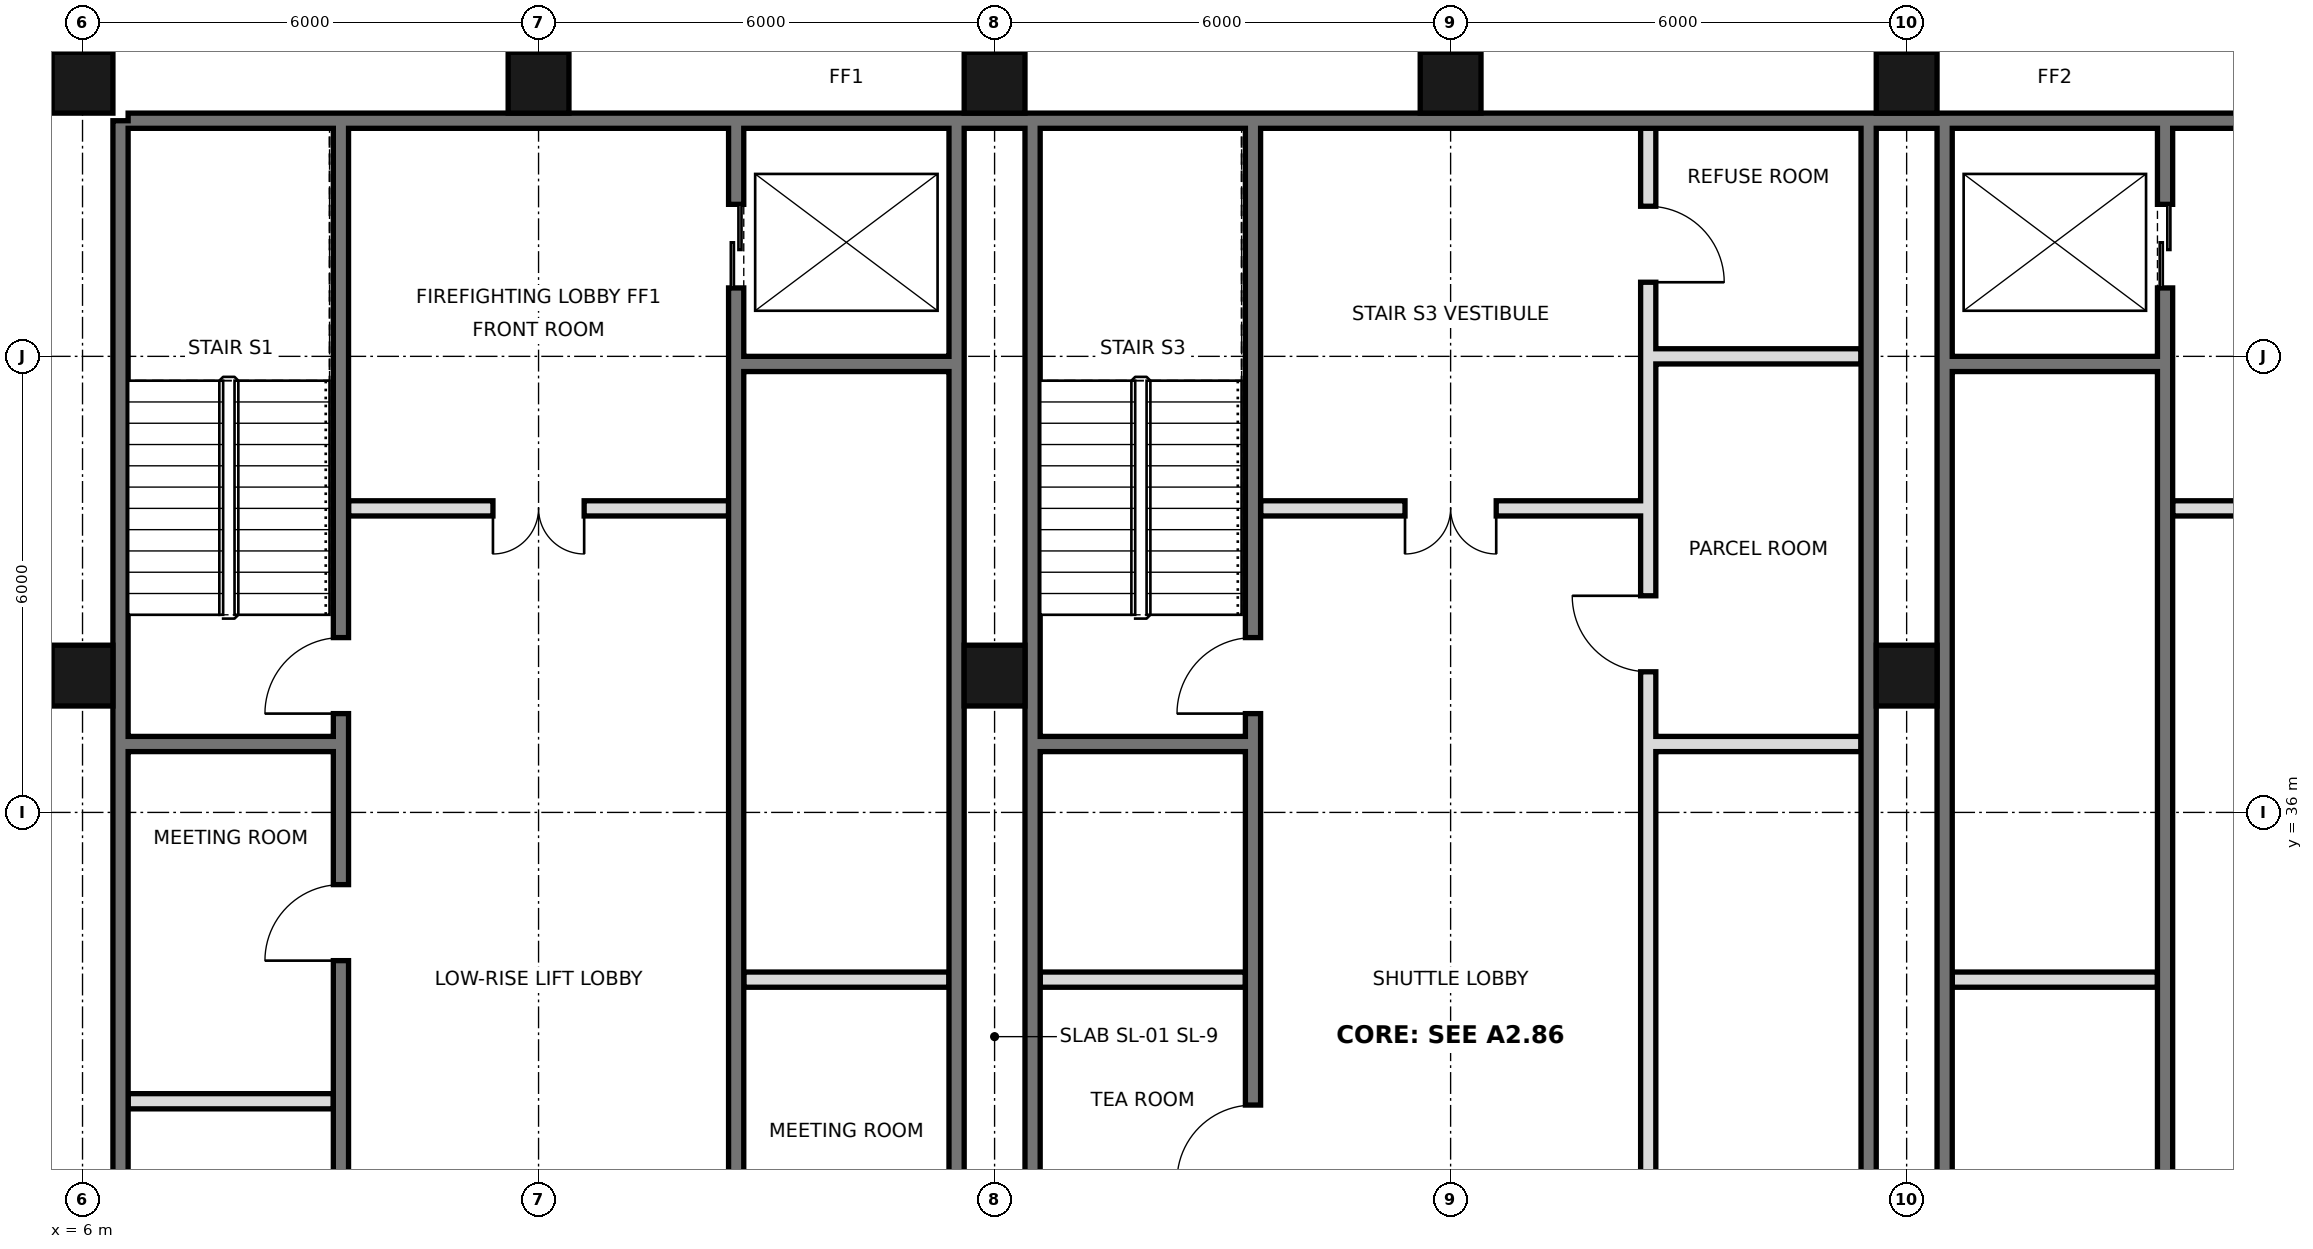
"""IFC4 building model, lengths in metres.
Left out: names, types, materials, properties, quantities, classifications, styles, units other than length and angle.
Written with IfcOpenShell. Run it as: python <this file> out.ifc"""

import sys

from ifc_helpers import new_model, si_unit, direction, frame, frame_2d, origin, origin_2d, place, context, subcontext, project, spatial, rectangle, hollow_rectangle, extrude, element, fill, save


model = new_model("IFC4")
c1 = context("Model", 3, precision=1e-05, world=origin(), true_north=direction((0.0, 1.0)))
c2 = subcontext(c1, "Body", "Model", "MODEL_VIEW")
j1 = project(units=[si_unit("LENGTHUNIT", "METRE"), si_unit("PLANEANGLEUNIT", "RADIAN")], contexts=[c1])
p1 = place(None, origin())
s1 = spatial("IfcSite", under=j1, at=p1, CompositionType="ELEMENT")
p2 = place(p1, origin())
s2 = spatial("IfcBuilding", under=s1, at=p2, CompositionType="ELEMENT")
p3 = place(p2, frame((0.0, 0.0, 345.8)))
s3 = spatial("IfcBuildingStorey", under=s2, at=p3, CompositionType="ELEMENT", Elevation=345.8)
for number, where, z_axis, x_axis in (
    (1, (6.0, 37.8, 0.0), (0.0, 0.0, 1.0), (1.0, 0.0, 0.0)),
    (2, (6.0, 45.6, 0.0), (0.0, 0.0, 1.0), (1.0, 0.0, 0.0)),
    (3, (12.0, 45.6, 0.0), (0.0, 0.0, 1.0), (1.0, 0.0, 0.0)),
    (4, (18.0, 37.8, 0.0), (0.0, 0.0, 1.0), (1.0, 0.0, 0.0)),
    (5, (18.0, 45.6, 0.0), (0.0, 0.0, 1.0), (1.0, 0.0, 0.0)),
    (6, (24.0, 45.6, 0.0), (0.0, 0.0, 1.0), (1.0, 0.0, 0.0)),
    (7, (30.0, 37.8, 0.0), (0.0, 0.0, 1.0), (1.0, 0.0, 0.0)),
    (8, (30.0, 45.6, 0.0), (0.0, 0.0, 1.0), (1.0, 0.0, 0.0)),
):
    element("IfcColumn", number, at=place(p3, frame(where, z_axis=z_axis, x_axis=x_axis)), inside=s3, PredefinedType="COLUMN", context=c2, shape_type="SweptSolid", body=[
        extrude(hollow_rectangle(XDim=0.8, YDim=0.8, WallThickness=0.025, at=origin_2d()), origin(), (0.0, 0.0, 1.0), 4.0),
    ])
p4 = place(p3, frame((6.5, 21.6, 0.0), z_axis=(0.0, 0.0, 1.0), x_axis=(0.0, 1.0, 0.0)))
e9 = element("IfcWall", 9, at=p4, inside=s3, PredefinedType="SOLIDWALL", context=c2, shape_type="SweptSolid", body=[
    extrude(rectangle(XDim=23.5, YDim=0.2, at=frame_2d((11.75, 0.0))), origin(), (0.0, 0.0, 1.0), 3.75),
])
p5 = place(p3, frame((6.6, 45.1, 0.0), z_axis=(0.0, 0.0, 1.0), x_axis=(1.0, 0.0, 0.0)))
e10 = element("IfcWall", 10, at=p5, inside=s3, PredefinedType="SOLIDWALL", context=c2, shape_type="SweptSolid", body=[
    extrude(rectangle(XDim=34.8, YDim=0.2, at=frame_2d((17.4, 0.0))), origin(), (0.0, 0.0, 1.0), 3.75),
])
for number, where, z_axis, x_axis in (
    (11, (17.5, 27.6, 0.0), (0.0, 0.0, 1.0), (0.0, 1.0, 0.0)),
    (12, (18.5, 27.6, 0.0), (0.0, 0.0, 1.0), (0.0, 1.0, 0.0)),
    (13, (29.5, 27.6, 0.0), (0.0, 0.0, 1.0), (0.0, 1.0, 0.0)),
    (14, (30.5, 27.6, 0.0), (0.0, 0.0, 1.0), (0.0, 1.0, 0.0)),
):
    element("IfcWall", number, at=place(p3, frame(where, z_axis=z_axis, x_axis=x_axis)), inside=s3, PredefinedType="SOLIDWALL", context=c2, shape_type="SweptSolid", body=[
        extrude(rectangle(XDim=17.5, YDim=0.2, at=frame_2d((8.75, 0.0))), origin(), (0.0, 0.0, 1.0), 3.75),
    ])
p6 = place(p3, frame((14.6, 27.5, 0.0), z_axis=(0.0, 0.0, 1.0), x_axis=(0.0, 1.0, 0.0)))
e15 = element("IfcWall", 15, at=p6, inside=s3, PredefinedType="SOLIDWALL", context=c2, shape_type="SweptSolid", body=[
    extrude(rectangle(XDim=17.5, YDim=0.2, at=frame_2d((8.75, 0.0))), origin(), (0.0, 0.0, 1.0), 3.75),
])
p7 = place(p6, frame((15.4, 0.0, 0.0)))
e16 = element("IfcOpeningElement", 16, at=p7, cuts=e15, PredefinedType="OPENING", context=c2, shape_type="SweptSolid", body=[
    extrude(rectangle(XDim=1.1, YDim=2.1, at=frame_2d((0.55, 1.05))), frame((0.0, 0.11, 0.0), z_axis=(0.0, -1.0, 0.0), x_axis=(1.0, 0.0, 0.0)), (0.0, 0.0, 1.0), 0.22),
])
p8 = place(p6, frame((2.7, 0.0, 0.0)))
e17 = element("IfcOpeningElement", 17, at=p8, cuts=e15, PredefinedType="OPENING", context=c2, shape_type="SweptSolid", body=[
    extrude(rectangle(XDim=1.0, YDim=2.1, at=frame_2d((0.5, 1.05))), frame((0.0, 0.11, 0.0), z_axis=(0.0, -1.0, 0.0), x_axis=(1.0, 0.0, 0.0)), (0.0, 0.0, 1.0), 0.22),
])
p9 = place(p3, frame((21.4, 27.5, 0.0), z_axis=(0.0, 0.0, 1.0), x_axis=(0.0, 1.0, 0.0)))
e18 = element("IfcWall", 18, at=p9, inside=s3, PredefinedType="SOLIDWALL", context=c2, shape_type="SweptSolid", body=[
    extrude(rectangle(XDim=17.5, YDim=0.2, at=frame_2d((8.75, 0.0))), origin(), (0.0, 0.0, 1.0), 3.75),
])
p10 = place(p9, frame((0.55, 0.0, 0.0)))
e19 = element("IfcOpeningElement", 19, at=p10, cuts=e18, PredefinedType="OPENING", context=c2, shape_type="SweptSolid", body=[
    extrude(rectangle(XDim=1.0, YDim=2.1, at=frame_2d((0.5, 1.05))), frame((0.0, 0.11, 0.0), z_axis=(0.0, -1.0, 0.0), x_axis=(1.0, 0.0, 0.0)), (0.0, 0.0, 1.0), 0.22),
])
p11 = place(p9, frame((3.65, 0.0, 0.0)))
e20 = element("IfcOpeningElement", 20, at=p11, cuts=e18, PredefinedType="OPENING", context=c2, shape_type="SweptSolid", body=[
    extrude(rectangle(XDim=1.0, YDim=2.1, at=frame_2d((0.5, 1.05))), frame((0.0, 0.11, 0.0), z_axis=(0.0, -1.0, 0.0), x_axis=(1.0, 0.0, 0.0)), (0.0, 0.0, 1.0), 0.22),
])
p12 = place(p9, frame((9.8, 0.0, 0.0)))
e21 = element("IfcOpeningElement", 21, at=p12, cuts=e18, PredefinedType="OPENING", context=c2, shape_type="SweptSolid", body=[
    extrude(rectangle(XDim=1.0, YDim=2.1, at=frame_2d((0.5, 1.05))), frame((0.0, 0.11, 0.0), z_axis=(0.0, -1.0, 0.0), x_axis=(1.0, 0.0, 0.0)), (0.0, 0.0, 1.0), 0.22),
])
p13 = place(p3, frame((26.6, 27.6, 0.0), z_axis=(0.0, 0.0, 1.0), x_axis=(0.0, 1.0, 0.0)))
e22 = element("IfcWall", 22, at=p13, inside=s3, PredefinedType="PARTITIONING", context=c2, shape_type="SweptSolid", body=[
    extrude(rectangle(XDim=17.4, YDim=0.2, at=frame_2d((8.7, 0.0))), origin(), (0.0, 0.0, 1.0), 3.75),
])
p14 = place(p13, frame((10.25, 0.0, 0.0)))
e23 = element("IfcOpeningElement", 23, at=p14, cuts=e22, PredefinedType="OPENING", context=c2, shape_type="SweptSolid", body=[
    extrude(rectangle(XDim=1.0, YDim=2.1, at=frame_2d((0.5, 1.05))), frame((0.0, 0.11, 0.0), z_axis=(0.0, -1.0, 0.0), x_axis=(1.0, 0.0, 0.0)), (0.0, 0.0, 1.0), 0.22),
])
p15 = place(p13, frame((15.375, 0.0, 0.0)))
e24 = element("IfcOpeningElement", 24, at=p15, cuts=e22, PredefinedType="OPENING", context=c2, shape_type="SweptSolid", body=[
    extrude(rectangle(XDim=1.0, YDim=2.1, at=frame_2d((0.5, 1.05))), frame((0.0, 0.11, 0.0), z_axis=(0.0, -1.0, 0.0), x_axis=(1.0, 0.0, 0.0)), (0.0, 0.0, 1.0), 0.22),
])
p16 = place(p3, frame((33.4, 27.5, 0.0), z_axis=(0.0, 0.0, 1.0), x_axis=(0.0, 1.0, 0.0)))
e25 = element("IfcWall", 25, at=p16, inside=s3, PredefinedType="SOLIDWALL", context=c2, shape_type="SweptSolid", body=[
    extrude(rectangle(XDim=17.5, YDim=0.2, at=frame_2d((8.75, 0.0))), origin(), (0.0, 0.0, 1.0), 3.75),
])
p17 = place(p16, frame((15.4, 0.0, 0.0)))
e26 = element("IfcOpeningElement", 26, at=p17, cuts=e25, PredefinedType="OPENING", context=c2, shape_type="SweptSolid", body=[
    extrude(rectangle(XDim=1.1, YDim=2.1, at=frame_2d((0.55, 1.05))), frame((0.0, 0.11, 0.0), z_axis=(0.0, -1.0, 0.0), x_axis=(1.0, 0.0, 0.0)), (0.0, 0.0, 1.0), 0.22),
])
p18 = place(p16, frame((2.7, 0.0, 0.0)))
e27 = element("IfcOpeningElement", 27, at=p18, cuts=e25, PredefinedType="OPENING", context=c2, shape_type="SweptSolid", body=[
    extrude(rectangle(XDim=1.0, YDim=2.1, at=frame_2d((0.5, 1.05))), frame((0.0, 0.11, 0.0), z_axis=(0.0, -1.0, 0.0), x_axis=(1.0, 0.0, 0.0)), (0.0, 0.0, 1.0), 0.22),
])
p19 = place(p3, frame((9.4, 21.5, 0.0), z_axis=(0.0, 0.0, 1.0), x_axis=(0.0, 1.0, 0.0)))
e28 = element("IfcWall", 28, at=p19, inside=s3, PredefinedType="SOLIDWALL", context=c2, shape_type="SweptSolid", body=[
    extrude(rectangle(XDim=23.5, YDim=0.2, at=frame_2d((11.75, 0.0))), origin(), (0.0, 0.0, 1.0), 3.75),
])
p20 = place(p19, frame((7.9, 0.0, 0.0)))
e29 = element("IfcOpeningElement", 29, at=p20, cuts=e28, PredefinedType="OPENING", context=c2, shape_type="SweptSolid", body=[
    extrude(rectangle(XDim=1.0, YDim=2.1, at=frame_2d((0.5, 1.05))), frame((0.0, 0.11, 0.0), z_axis=(0.0, -1.0, 0.0), x_axis=(1.0, 0.0, 0.0)), (0.0, 0.0, 1.0), 0.22),
])
p21 = place(p19, frame((12.55, 0.0, 0.0)))
e30 = element("IfcOpeningElement", 30, at=p21, cuts=e28, PredefinedType="OPENING", context=c2, shape_type="SweptSolid", body=[
    extrude(rectangle(XDim=1.0, YDim=2.1, at=frame_2d((0.5, 1.05))), frame((0.0, 0.11, 0.0), z_axis=(0.0, -1.0, 0.0), x_axis=(1.0, 0.0, 0.0)), (0.0, 0.0, 1.0), 0.22),
])
p22 = place(p19, frame((15.8, 0.0, 0.0)))
e31 = element("IfcOpeningElement", 31, at=p22, cuts=e28, PredefinedType="OPENING", context=c2, shape_type="SweptSolid", body=[
    extrude(rectangle(XDim=1.0, YDim=2.1, at=frame_2d((0.5, 1.05))), frame((0.0, 0.11, 0.0), z_axis=(0.0, -1.0, 0.0), x_axis=(1.0, 0.0, 0.0)), (0.0, 0.0, 1.0), 0.22),
])
p23 = place(p19, frame((0.275, 0.0, 0.0)))
e32 = element("IfcOpeningElement", 32, at=p23, cuts=e28, PredefinedType="OPENING", context=c2, shape_type="SweptSolid", body=[
    extrude(rectangle(XDim=0.9, YDim=2.1, at=frame_2d((0.45, 1.05))), frame((0.0, 0.11, 0.0), z_axis=(0.0, -1.0, 0.0), x_axis=(1.0, 0.0, 0.0)), (0.0, 0.0, 1.0), 0.22),
])
for number, where, z_axis, x_axis in (
    (33, (6.6, 32.2, 0.0), (0.0, 0.0, 1.0), (1.0, 0.0, 0.0)),
    (34, (14.7, 33.8, 0.0), (0.0, 0.0, 1.0), (1.0, 0.0, 0.0)),
    (35, (18.6, 33.8, 0.0), (0.0, 0.0, 1.0), (1.0, 0.0, 0.0)),
    (36, (30.6, 33.8, 0.0), (0.0, 0.0, 1.0), (1.0, 0.0, 0.0)),
):
    element("IfcWall", number, at=place(p3, frame(where, z_axis=z_axis, x_axis=x_axis)), inside=s3, PredefinedType="PARTITIONING", context=c2, shape_type="SweptSolid", body=[
        extrude(rectangle(XDim=2.7, YDim=0.2, at=frame_2d((1.35, 0.0))), origin(), (0.0, 0.0, 1.0), 3.75),
    ])
p24 = place(p3, frame((18.6, 36.9, 0.0), z_axis=(0.0, 0.0, 1.0), x_axis=(1.0, 0.0, 0.0)))
e37 = element("IfcWall", 37, at=p24, inside=s3, PredefinedType="SOLIDWALL", context=c2, shape_type="SweptSolid", body=[
    extrude(rectangle(XDim=2.7, YDim=0.2, at=frame_2d((1.35, 0.0))), origin(), (0.0, 0.0, 1.0), 3.75),
])
p25 = place(p3, frame((26.7, 36.9, 0.0), z_axis=(0.0, 0.0, 1.0), x_axis=(1.0, 0.0, 0.0)))
e38 = element("IfcWall", 38, at=p25, inside=s3, PredefinedType="PARTITIONING", context=c2, shape_type="SweptSolid", body=[
    extrude(rectangle(XDim=2.7, YDim=0.2, at=frame_2d((1.35, 0.0))), origin(), (0.0, 0.0, 1.0), 3.75),
])
p26 = place(p3, frame((6.6, 36.9, 0.0), z_axis=(0.0, 0.0, 1.0), x_axis=(1.0, 0.0, 0.0)))
e39 = element("IfcWall", 39, at=p26, inside=s3, PredefinedType="SOLIDWALL", context=c2, shape_type="SweptSolid", body=[
    extrude(rectangle(XDim=2.7, YDim=0.2, at=frame_2d((1.35, 0.0))), origin(), (0.0, 0.0, 1.0), 3.75),
])
p27 = place(p3, frame((21.5, 40.0, 0.0), z_axis=(0.0, 0.0, 1.0), x_axis=(1.0, 0.0, 0.0)))
e40 = element("IfcWall", 40, at=p27, inside=s3, PredefinedType="PARTITIONING", context=c2, shape_type="SweptSolid", body=[
    extrude(rectangle(XDim=5.0, YDim=0.2, at=frame_2d((2.5, 0.0))), origin(), (0.0, 0.0, 1.0), 3.75),
])
p28 = place(p27, frame((1.9, 0.0, 0.0)))
e41 = element("IfcOpeningElement", 41, at=p28, cuts=e40, PredefinedType="OPENING", context=c2, shape_type="SweptSolid", body=[
    extrude(rectangle(XDim=1.2, YDim=2.1, at=frame_2d((0.6, 1.05))), frame((0.0, 0.11, 0.0), z_axis=(0.0, -1.0, 0.0), x_axis=(1.0, 0.0, 0.0)), (0.0, 0.0, 1.0), 0.22),
])
p29 = place(p3, frame((33.5, 40.0, 0.0), z_axis=(0.0, 0.0, 1.0), x_axis=(1.0, 0.0, 0.0)))
e42 = element("IfcWall", 42, at=p29, inside=s3, PredefinedType="PARTITIONING", context=c2, shape_type="SweptSolid", body=[
    extrude(rectangle(XDim=5.0, YDim=0.2, at=frame_2d((2.5, 0.0))), origin(), (0.0, 0.0, 1.0), 3.75),
])
p30 = place(p29, frame((1.9, 0.0, 0.0)))
e43 = element("IfcOpeningElement", 43, at=p30, cuts=e42, PredefinedType="OPENING", context=c2, shape_type="SweptSolid", body=[
    extrude(rectangle(XDim=1.2, YDim=2.1, at=frame_2d((0.6, 1.05))), frame((0.0, 0.11, 0.0), z_axis=(0.0, -1.0, 0.0), x_axis=(1.0, 0.0, 0.0)), (0.0, 0.0, 1.0), 0.22),
])
p31 = place(p3, frame((9.5, 40.0, 0.0), z_axis=(0.0, 0.0, 1.0), x_axis=(1.0, 0.0, 0.0)))
e44 = element("IfcWall", 44, at=p31, inside=s3, PredefinedType="PARTITIONING", context=c2, shape_type="SweptSolid", body=[
    extrude(rectangle(XDim=5.0, YDim=0.2, at=frame_2d((2.5, 0.0))), origin(), (0.0, 0.0, 1.0), 3.75),
])
p32 = place(p31, frame((1.9, 0.0, 0.0)))
e45 = element("IfcOpeningElement", 45, at=p32, cuts=e44, PredefinedType="OPENING", context=c2, shape_type="SweptSolid", body=[
    extrude(rectangle(XDim=1.2, YDim=2.1, at=frame_2d((0.6, 1.05))), frame((0.0, 0.11, 0.0), z_axis=(0.0, -1.0, 0.0), x_axis=(1.0, 0.0, 0.0)), (0.0, 0.0, 1.0), 0.22),
])
for number, where, z_axis, x_axis in (
    (46, (14.7, 41.9, 0.0), (0.0, 0.0, 1.0), (1.0, 0.0, 0.0)),
    (47, (30.6, 41.9, 0.0), (0.0, 0.0, 1.0), (1.0, 0.0, 0.0)),
):
    element("IfcWall", number, at=place(p3, frame(where, z_axis=z_axis, x_axis=x_axis)), inside=s3, PredefinedType="SOLIDWALL", context=c2, shape_type="SweptSolid", body=[
        extrude(rectangle(XDim=2.7, YDim=0.2, at=frame_2d((1.35, 0.0))), origin(), (0.0, 0.0, 1.0), 3.75),
    ])
p33 = place(p3, frame((26.7, 42.0, 0.0), z_axis=(0.0, 0.0, 1.0), x_axis=(1.0, 0.0, 0.0)))
e48 = element("IfcWall", 48, at=p33, inside=s3, PredefinedType="PARTITIONING", context=c2, shape_type="SweptSolid", body=[
    extrude(rectangle(XDim=2.7, YDim=0.2, at=frame_2d((1.35, 0.0))), origin(), (0.0, 0.0, 1.0), 3.75),
])
p34 = place(p32, frame((1.2, 0.0, 0.0), z_axis=(0.0, 0.0, 1.0), x_axis=(-1.0, 0.0, 0.0)))
e49 = element("IfcDoor", 49, at=p34, inside=s3, OperationType="DOUBLE_DOOR_SINGLE_SWING", PredefinedType="DOOR", context=c2, shape_type="SweptSolid", body=[
    extrude(rectangle(XDim=1.2, YDim=2.1, at=frame_2d((0.6, 1.05))), frame((0.0, 0.025, 0.0), z_axis=(0.0, -1.0, 0.0), x_axis=(1.0, 0.0, 0.0)), (0.0, 0.0, 1.0), 0.05),
])
fill(e45, e49)
p35 = place(p28, frame((1.2, 0.0, 0.0), z_axis=(0.0, 0.0, 1.0), x_axis=(-1.0, 0.0, 0.0)))
e50 = element("IfcDoor", 50, at=p35, inside=s3, OperationType="DOUBLE_DOOR_SINGLE_SWING", PredefinedType="DOOR", context=c2, shape_type="SweptSolid", body=[
    extrude(rectangle(XDim=1.2, YDim=2.1, at=frame_2d((0.6, 1.05))), frame((0.0, 0.025, 0.0), z_axis=(0.0, -1.0, 0.0), x_axis=(1.0, 0.0, 0.0)), (0.0, 0.0, 1.0), 0.05),
])
fill(e41, e50)
p36 = place(p17, origin())
e51 = element("IfcDoor", 51, at=p36, inside=s3, OperationType="DOUBLE_DOOR_SLIDING", PredefinedType="DOOR", context=c2, shape_type="SweptSolid", body=[
    extrude(rectangle(XDim=1.1, YDim=2.1, at=frame_2d((0.55, 1.05))), frame((0.0, 0.025, 0.0), z_axis=(0.0, -1.0, 0.0), x_axis=(1.0, 0.0, 0.0)), (0.0, 0.0, 1.0), 0.05),
])
fill(e26, e51)
p37 = place(p7, origin())
e52 = element("IfcDoor", 52, at=p37, inside=s3, OperationType="DOUBLE_DOOR_SLIDING", PredefinedType="DOOR", context=c2, shape_type="SweptSolid", body=[
    extrude(rectangle(XDim=1.1, YDim=2.1, at=frame_2d((0.55, 1.05))), frame((0.0, 0.025, 0.0), z_axis=(0.0, -1.0, 0.0), x_axis=(1.0, 0.0, 0.0)), (0.0, 0.0, 1.0), 0.05),
])
fill(e16, e52)
p38 = place(p11, origin())
e53 = element("IfcDoor", 53, at=p38, inside=s3, OperationType="SINGLE_SWING_LEFT", PredefinedType="DOOR", context=c2, shape_type="SweptSolid", body=[
    extrude(rectangle(XDim=1.0, YDim=2.1, at=frame_2d((0.5, 1.05))), frame((0.0, 0.025, 0.0), z_axis=(0.0, -1.0, 0.0), x_axis=(1.0, 0.0, 0.0)), (0.0, 0.0, 1.0), 0.05),
])
fill(e20, e53)
p39 = place(p21, origin())
e54 = element("IfcDoor", 54, at=p39, inside=s3, OperationType="SINGLE_SWING_LEFT", PredefinedType="DOOR", context=c2, shape_type="SweptSolid", body=[
    extrude(rectangle(XDim=1.0, YDim=2.1, at=frame_2d((0.5, 1.05))), frame((0.0, 0.025, 0.0), z_axis=(0.0, -1.0, 0.0), x_axis=(1.0, 0.0, 0.0)), (0.0, 0.0, 1.0), 0.05),
])
fill(e30, e54)
p40 = place(p22, origin())
e55 = element("IfcDoor", 55, at=p40, inside=s3, OperationType="SINGLE_SWING_LEFT", PredefinedType="DOOR", context=c2, shape_type="SweptSolid", body=[
    extrude(rectangle(XDim=1.0, YDim=2.1, at=frame_2d((0.5, 1.05))), frame((0.0, 0.025, 0.0), z_axis=(0.0, -1.0, 0.0), x_axis=(1.0, 0.0, 0.0)), (0.0, 0.0, 1.0), 0.05),
])
fill(e31, e55)
p41 = place(p12, origin())
e56 = element("IfcDoor", 56, at=p41, inside=s3, OperationType="SINGLE_SWING_LEFT", PredefinedType="DOOR", context=c2, shape_type="SweptSolid", body=[
    extrude(rectangle(XDim=1.0, YDim=2.1, at=frame_2d((0.5, 1.05))), frame((0.0, 0.025, 0.0), z_axis=(0.0, -1.0, 0.0), x_axis=(1.0, 0.0, 0.0)), (0.0, 0.0, 1.0), 0.05),
])
fill(e21, e56)
p42 = place(p14, frame((1.0, 0.0, 0.0), z_axis=(0.0, 0.0, 1.0), x_axis=(-1.0, 0.0, 0.0)))
e57 = element("IfcDoor", 57, at=p42, inside=s3, OperationType="SINGLE_SWING_LEFT", PredefinedType="DOOR", context=c2, shape_type="SweptSolid", body=[
    extrude(rectangle(XDim=1.0, YDim=2.1, at=frame_2d((0.5, 1.05))), frame((0.0, 0.025, 0.0), z_axis=(0.0, -1.0, 0.0), x_axis=(1.0, 0.0, 0.0)), (0.0, 0.0, 1.0), 0.05),
])
fill(e23, e57)
p43 = place(p15, frame((1.0, 0.0, 0.0), z_axis=(0.0, 0.0, 1.0), x_axis=(-1.0, 0.0, 0.0)))
e58 = element("IfcDoor", 58, at=p43, inside=s3, OperationType="SINGLE_SWING_RIGHT", PredefinedType="DOOR", context=c2, shape_type="SweptSolid", body=[
    extrude(rectangle(XDim=1.0, YDim=2.1, at=frame_2d((0.5, 1.05))), frame((0.0, 0.025, 0.0), z_axis=(0.0, -1.0, 0.0), x_axis=(1.0, 0.0, 0.0)), (0.0, 0.0, 1.0), 0.05),
])
fill(e24, e58)
save(model, sys.argv[1])
